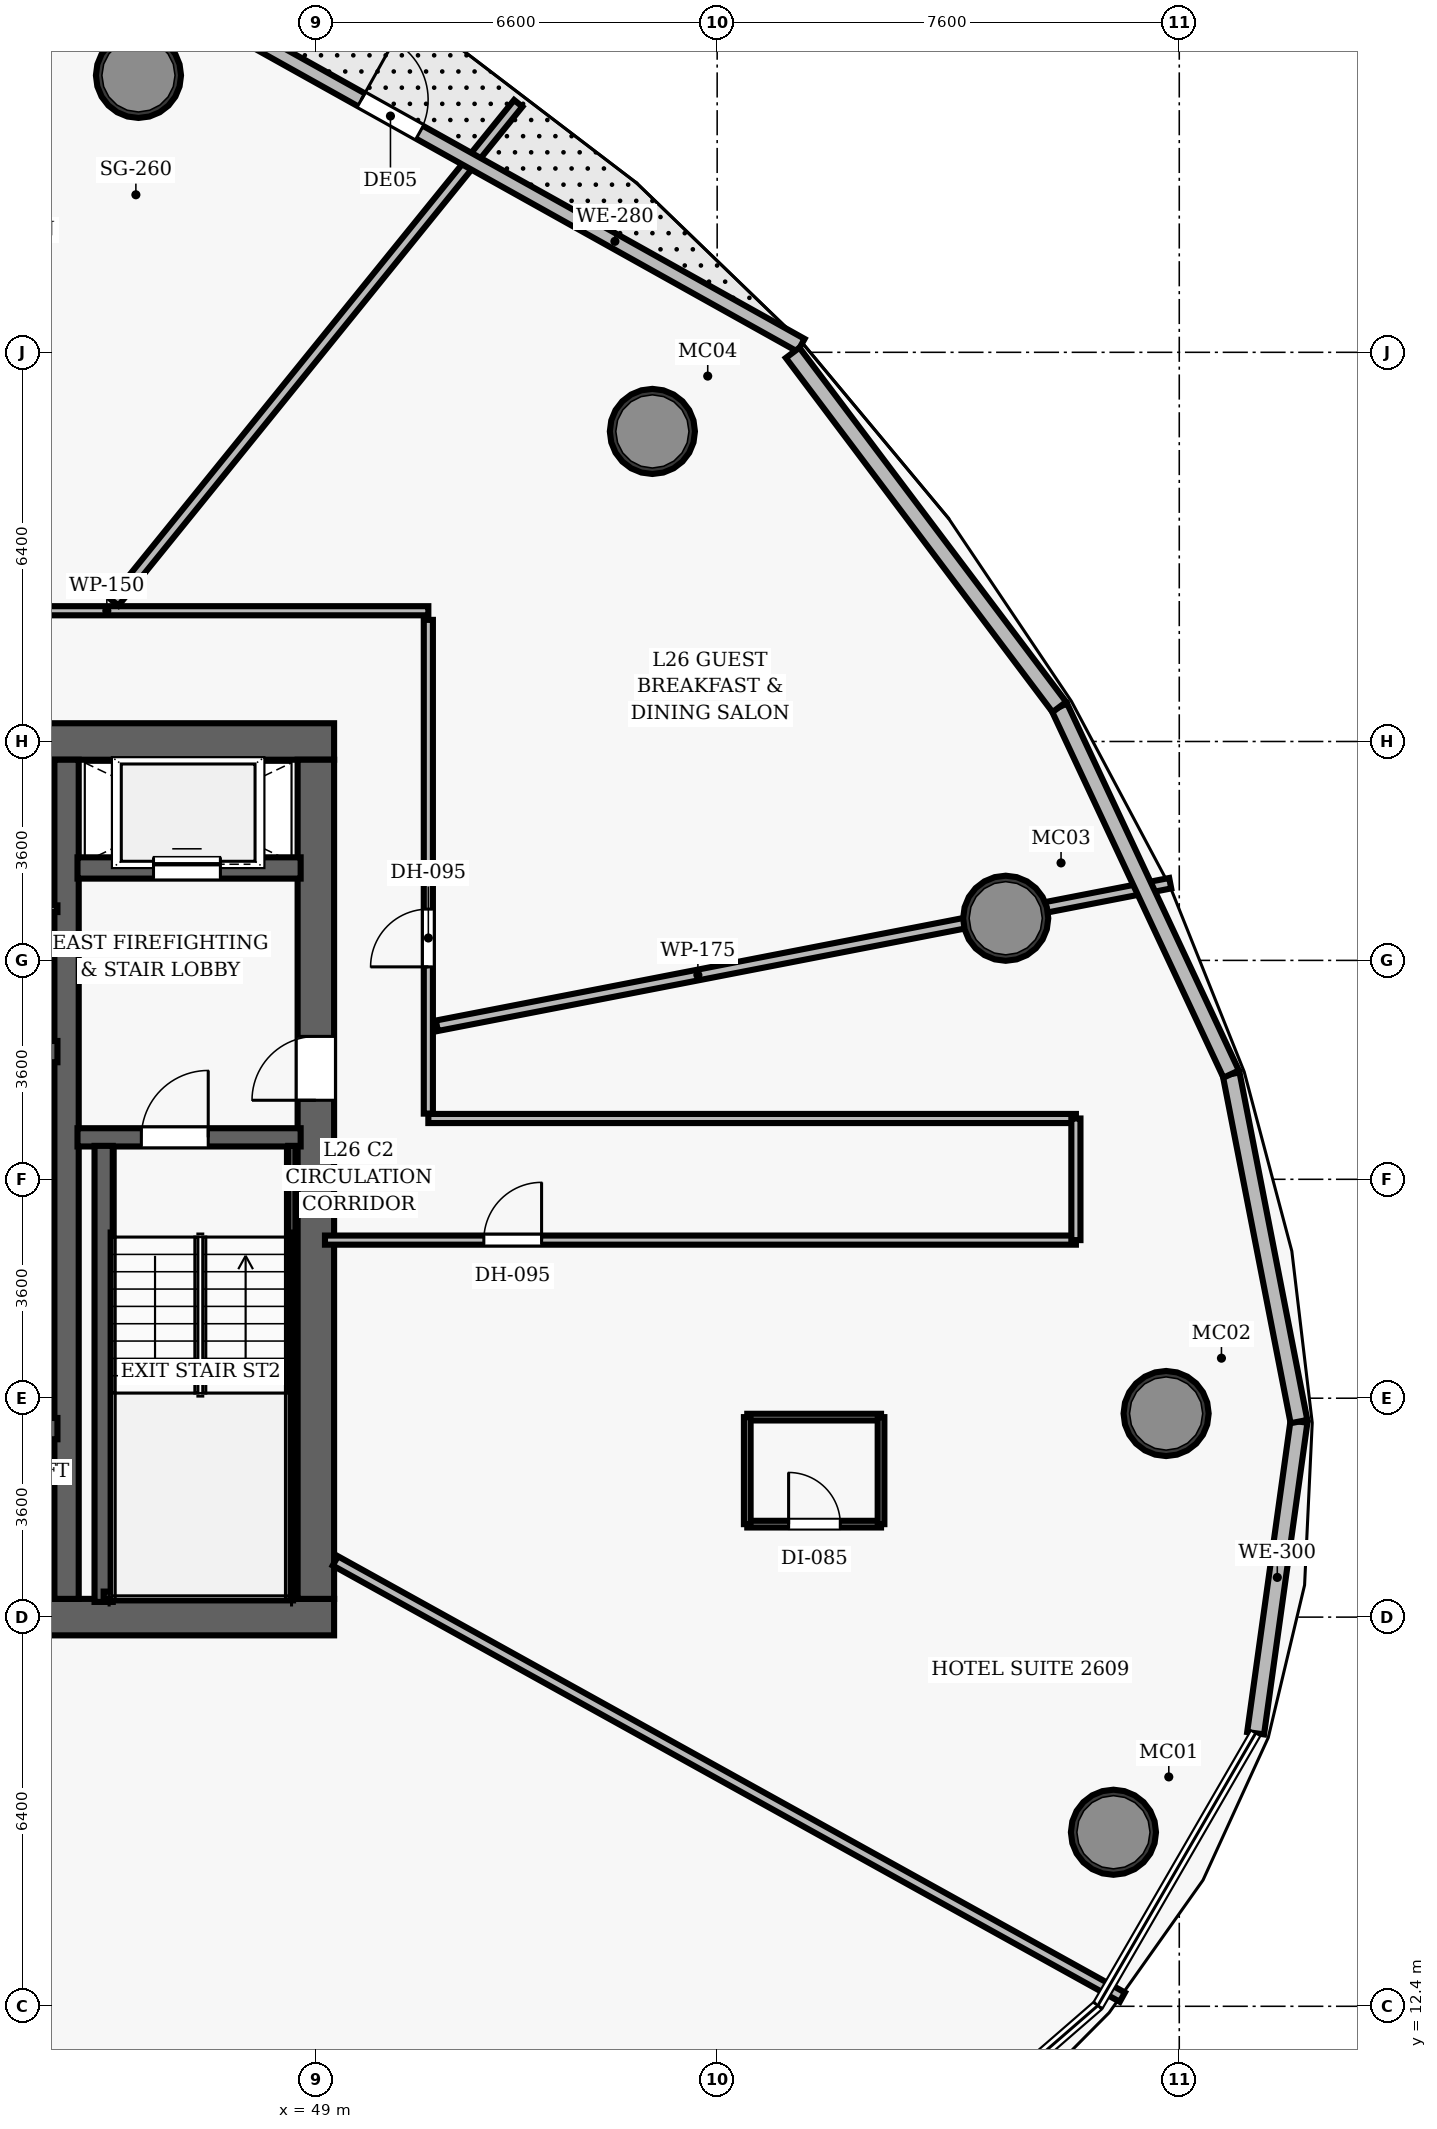
"""IFC4 building model, lengths in metres.
Left out: names, types, materials, properties, quantities, classifications, styles, units other than length and angle.
Written with IfcOpenShell. Run it as: python <this file> out.ifc"""

import sys

from ifc_helpers import new_model, si_unit, direction, frame, frame_2d, origin, origin_2d, place, context, subcontext, project, spatial, rectangle, hollow_circle, extrude, element, fill, save


model = new_model("IFC4")
c1 = context("Model", 3, precision=1e-05, world=origin(), true_north=direction((0.0, 1.0)))
c2 = subcontext(c1, "Body", "Model", "MODEL_VIEW")
j1 = project(units=[si_unit("LENGTHUNIT", "METRE"), si_unit("PLANEANGLEUNIT", "RADIAN")], contexts=[c1])
p1 = place(None, origin())
s1 = spatial("IfcSite", under=j1, at=p1, CompositionType="ELEMENT")
p2 = place(p1, origin())
s2 = spatial("IfcBuilding", under=s1, at=p2, CompositionType="ELEMENT")
p3 = place(p2, frame((0.0, 0.0, 109.8)))
s3 = spatial("IfcBuildingStorey", under=s2, at=p3, CompositionType="ELEMENT", Elevation=109.8)
p4 = place(p3, frame((26.7, 18.8, 0.0), z_axis=(0.0, 0.0, 1.0), x_axis=(1.0, 0.0, 0.0)))
e1 = element("IfcWall", 1, at=p4, inside=s3, PredefinedType="SHEAR", context=c2, shape_type="SweptSolid", body=[
    extrude(rectangle(XDim=22.6, YDim=0.6, at=frame_2d((11.3, 0.0))), origin(), (0.0, 0.0, 1.0), 3.5),
])
p5 = place(p4, frame((14.52, 0.0, 0.0)))
e2 = element("IfcOpeningElement", 2, at=p5, cuts=e1, PredefinedType="OPENING", context=c2, shape_type="SweptSolid", body=[
    extrude(rectangle(XDim=1.05, YDim=2.15, at=frame_2d((0.525, 1.075))), frame((0.0, 0.31, 0.0), z_axis=(0.0, -1.0, 0.0), x_axis=(1.0, 0.0, 0.0)), (0.0, 0.0, 1.0), 0.62),
])
p6 = place(p3, frame((26.7, 33.2, 0.0), z_axis=(0.0, 0.0, 1.0), x_axis=(1.0, 0.0, 0.0)))
e3 = element("IfcWall", 3, at=p6, inside=s3, PredefinedType="SHEAR", context=c2, shape_type="SweptSolid", body=[
    extrude(rectangle(XDim=22.6, YDim=0.6, at=frame_2d((11.3, 0.0))), origin(), (0.0, 0.0, 1.0), 3.5),
])
p7 = place(p6, frame((4.62, 0.0, 0.0)))
e4 = element("IfcOpeningElement", 4, at=p7, cuts=e3, PredefinedType="OPENING", context=c2, shape_type="SweptSolid", body=[
    extrude(rectangle(XDim=1.05, YDim=2.15, at=frame_2d((0.525, 1.075))), frame((0.0, 0.31, 0.0), z_axis=(0.0, -1.0, 0.0), x_axis=(1.0, 0.0, 0.0)), (0.0, 0.0, 1.0), 0.62),
])
p8 = place(p6, frame((14.52, 0.0, 0.0)))
e5 = element("IfcOpeningElement", 5, at=p8, cuts=e3, PredefinedType="OPENING", context=c2, shape_type="SweptSolid", body=[
    extrude(rectangle(XDim=1.05, YDim=2.15, at=frame_2d((0.525, 1.075))), frame((0.0, 0.31, 0.0), z_axis=(0.0, -1.0, 0.0), x_axis=(1.0, 0.0, 0.0)), (0.0, 0.0, 1.0), 0.62),
])
p9 = place(p3, frame((49.0, 19.1, 0.0), z_axis=(0.0, 0.0, 1.0), x_axis=(0.0, 1.0, 0.0)))
e6 = element("IfcWall", 6, at=p9, inside=s3, PredefinedType="SHEAR", context=c2, shape_type="SweptSolid", body=[
    extrude(rectangle(XDim=13.8, YDim=0.6, at=frame_2d((6.9, 0.0))), origin(), (0.0, 0.0, 1.0), 3.5),
])
p10 = place(p9, frame((8.2, 0.0, 0.0)))
e7 = element("IfcOpeningElement", 7, at=p10, cuts=e6, PredefinedType="OPENING", context=c2, shape_type="SweptSolid", body=[
    extrude(rectangle(XDim=1.05, YDim=2.15, at=frame_2d((0.525, 1.075))), frame((0.0, 0.31, 0.0), z_axis=(0.0, -1.0, 0.0), x_axis=(1.0, 0.0, 0.0)), (0.0, 0.0, 1.0), 0.62),
])
p11 = place(p3, frame((44.9, 19.1, 0.0), z_axis=(0.0, 0.0, 1.0), x_axis=(0.0, 1.0, 0.0)))
e8 = element("IfcWall", 8, at=p11, inside=s3, PredefinedType="SHEAR", context=c2, shape_type="SweptSolid", body=[
    extrude(rectangle(XDim=13.8, YDim=0.4, at=frame_2d((6.9, 0.0))), origin(), (0.0, 0.0, 1.0), 3.5),
])
for number, where, z_axis, x_axis in (
    (9, (62.118, 15.262, 0.0), (0.0, 0.0, 1.0), (1.0, 0.0, 0.0)),
    (10, (62.984, 22.148, 0.0), (0.0, 0.0, 1.0), (1.0, 0.0, 0.0)),
    (11, (60.346, 30.293, 0.0), (0.0, 0.0, 1.0), (1.0, 0.0, 0.0)),
    (12, (54.535, 38.299, 0.0), (0.0, 0.0, 1.0), (1.0, 0.0, 0.0)),
    (13, (46.083, 44.154, 0.0), (0.0, 0.0, 1.0), (1.0, 0.0, 0.0)),
):
    element("IfcColumn", number, at=place(p3, frame(where, z_axis=z_axis, x_axis=x_axis)), inside=s3, PredefinedType="COLUMN", context=c2, shape_type="SweptSolid", body=[
        extrude(hollow_circle(Radius=0.7, WallThickness=0.055, at=origin_2d()), origin(), (0.0, 0.0, 1.0), 3.5),
    ])
p12 = place(p3, frame((45.08, 26.69, 0.0), z_axis=(0.0, 0.0, 1.0), x_axis=(1.0, 0.0, 0.0)))
e14 = element("IfcWall", 14, at=p12, inside=s3, PredefinedType="SHEAR", context=c2, shape_type="SweptSolid", body=[
    extrude(rectangle(XDim=3.67, YDim=0.3, at=frame_2d((1.835, 0.0))), origin(), (0.0, 0.0, 1.0), 3.5),
])
p13 = place(p12, frame((1.05, 0.0, 0.0)))
e15 = element("IfcOpeningElement", 15, at=p13, cuts=e14, PredefinedType="OPENING", context=c2, shape_type="SweptSolid", body=[
    extrude(rectangle(XDim=1.1, YDim=2.15, at=frame_2d((0.55, 1.075))), frame((0.0, 0.16, 0.0), z_axis=(0.0, -1.0, 0.0), x_axis=(1.0, 0.0, 0.0)), (0.0, 0.0, 1.0), 0.32),
])
p14 = place(p3, frame((45.51, 19.05, 0.0), z_axis=(0.0, 0.0, 1.0), x_axis=(0.0, 1.0, 0.0)))
e16 = element("IfcWall", 16, at=p14, inside=s3, PredefinedType="SHEAR", context=c2, shape_type="SweptSolid", body=[
    extrude(rectangle(XDim=7.5, YDim=0.3, at=frame_2d((3.75, 0.0))), origin(), (0.0, 0.0, 1.0), 3.5),
])
p15 = place(p3, frame((48.605, 19.1, 0.0), z_axis=(0.0, 0.0, 1.0), x_axis=(0.0, 1.0, 0.0)))
e17 = element("IfcWall", 17, at=p15, inside=s3, PredefinedType="SHEAR", context=c2, shape_type="SweptSolid", body=[
    extrude(rectangle(XDim=7.45, YDim=0.12, at=frame_2d((3.725, 0.0))), origin(), (0.0, 0.0, 1.0), 3.5),
])
p16 = place(p3, frame((45.51, 19.16, 0.0), z_axis=(0.0, 0.0, 1.0), x_axis=(1.0, 0.0, 0.0)))
e18 = element("IfcWall", 18, at=p16, inside=s3, PredefinedType="SHEAR", context=c2, shape_type="SweptSolid", body=[
    extrude(rectangle(XDim=3.095, YDim=0.12, at=frame_2d((1.547, 0.0))), origin(), (0.0, 0.0, 1.0), 3.5),
])
p17 = place(p3, frame((45.08, 31.12, 0.0), z_axis=(0.0, 0.0, 1.0), x_axis=(1.0, 0.0, 0.0)))
e19 = element("IfcWall", 19, at=p17, inside=s3, PredefinedType="SHEAR", context=c2, shape_type="SweptSolid", body=[
    extrude(rectangle(XDim=3.67, YDim=0.35, at=frame_2d((1.835, 0.0))), origin(), (0.0, 0.0, 1.0), 2.675),
])
p18 = place(p17, frame((1.25, 0.0, 0.0)))
e20 = element("IfcOpeningElement", 20, at=p18, cuts=e19, PredefinedType="OPENING", context=c2, shape_type="SweptSolid", body=[
    extrude(rectangle(XDim=1.1, YDim=2.15, at=frame_2d((0.55, 1.075))), frame((0.0, 0.185, 0.0), z_axis=(0.0, -1.0, 0.0), x_axis=(1.0, 0.0, 0.0)), (0.0, 0.0, 1.0), 0.37),
])
for number, where, z_axis, x_axis in (
    (21, (42.72, 21.9, 0.0), (0.0, 0.0, 1.0), (1.0, 0.0, 0.0)),
    (22, (42.72, 28.1, 0.0), (0.0, 0.0, 1.0), (1.0, 0.0, 0.0)),
):
    element("IfcWall", number, at=place(p3, frame(where, z_axis=z_axis, x_axis=x_axis)), inside=s3, PredefinedType="SHEAR", context=c2, shape_type="SweptSolid", body=[
        extrude(rectangle(XDim=2.03, YDim=0.35, at=frame_2d((1.015, 0.0))), origin(), (0.0, 0.0, 1.0), 2.675),
    ])
p19 = place(p3, frame((42.55, 30.45, 0.0), z_axis=(0.0, 0.0, 1.0), x_axis=(1.0, 0.0, 0.0)))
e23 = element("IfcWall", 23, at=p19, inside=s3, PredefinedType="PARTITIONING", context=c2, shape_type="SweptSolid", body=[
    extrude(rectangle(XDim=2.2, YDim=0.11, at=frame_2d((1.1, 0.0))), origin(), (0.0, 0.0, 1.0), 2.675),
])
p20 = place(p3, frame((24.85, 35.35, 0.0), z_axis=(0.0, 0.0, 1.0), x_axis=(1.0, 0.0, 0.0)))
e24 = element("IfcWall", 24, at=p20, inside=s3, PredefinedType="PARTITIONING", context=c2, shape_type="SweptSolid", body=[
    extrude(rectangle(XDim=26.0, YDim=0.15, at=frame_2d((13.0, 0.0))), origin(), (0.0, 0.0, 1.0), 2.675),
])
p21 = place(p20, frame((14.325, 0.0, 0.0)))
e25 = element("IfcOpeningElement", 25, at=p21, cuts=e24, PredefinedType="OPENING", context=c2, shape_type="SweptSolid", body=[
    extrude(rectangle(XDim=0.95, YDim=2.15, at=frame_2d((0.475, 1.075))), frame((0.0, 0.085, 0.0), z_axis=(0.0, -1.0, 0.0), x_axis=(1.0, 0.0, 0.0)), (0.0, 0.0, 1.0), 0.17),
])
p22 = place(p20, frame((7.162, 0.0, 0.0)))
e26 = element("IfcOpeningElement", 26, at=p22, cuts=e24, PredefinedType="OPENING", context=c2, shape_type="SweptSolid", body=[
    extrude(rectangle(XDim=0.95, YDim=2.15, at=frame_2d((0.475, 1.075))), frame((0.0, 0.085, 0.0), z_axis=(0.0, -1.0, 0.0), x_axis=(1.0, 0.0, 0.0)), (0.0, 0.0, 1.0), 0.17),
])
p23 = place(p3, frame((50.85, 27.08, 0.0), z_axis=(0.0, 0.0, 1.0), x_axis=(0.0, 1.0, 0.0)))
e27 = element("IfcWall", 27, at=p23, inside=s3, PredefinedType="PARTITIONING", context=c2, shape_type="SweptSolid", body=[
    extrude(rectangle(XDim=8.12, YDim=0.15, at=frame_2d((4.06, 0.0))), origin(), (0.0, 0.0, 1.0), 2.675),
])
p24 = place(p23, frame((2.414, 0.0, 0.0)))
e28 = element("IfcOpeningElement", 28, at=p24, cuts=e27, PredefinedType="OPENING", context=c2, shape_type="SweptSolid", body=[
    extrude(rectangle(XDim=0.95, YDim=2.15, at=frame_2d((0.475, 1.075))), frame((0.0, 0.085, 0.0), z_axis=(0.0, -1.0, 0.0), x_axis=(1.0, 0.0, 0.0)), (0.0, 0.0, 1.0), 0.17),
])
p25 = place(p3, frame((50.85, 27.0, 0.0), z_axis=(0.0, 0.0, 1.0), x_axis=(1.0, 0.0, 0.0)))
e29 = element("IfcWall", 29, at=p25, inside=s3, PredefinedType="PARTITIONING", context=c2, shape_type="SweptSolid", body=[
    extrude(rectangle(XDim=10.65, YDim=0.15, at=frame_2d((5.325, 0.0))), origin(), (0.0, 0.0, 1.0), 2.675),
])
p26 = place(p3, frame((49.15, 25.0, 0.0), z_axis=(0.0, 0.0, 1.0), x_axis=(1.0, 0.0, 0.0)))
e30 = element("IfcWall", 30, at=p26, inside=s3, PredefinedType="PARTITIONING", context=c2, shape_type="SweptSolid", body=[
    extrude(rectangle(XDim=12.35, YDim=0.15, at=frame_2d((6.175, 0.0))), origin(), (0.0, 0.0, 1.0), 2.675),
])
p27 = place(p26, frame((2.613, 0.0, 0.0)))
e31 = element("IfcOpeningElement", 31, at=p27, cuts=e30, PredefinedType="OPENING", context=c2, shape_type="SweptSolid", body=[
    extrude(rectangle(XDim=0.95, YDim=2.15, at=frame_2d((0.475, 1.075))), frame((0.0, 0.085, 0.0), z_axis=(0.0, -1.0, 0.0), x_axis=(1.0, 0.0, 0.0)), (0.0, 0.0, 1.0), 0.17),
])
p28 = place(p3, frame((61.5, 25.0, 0.0), z_axis=(0.0, 0.0, 1.0), x_axis=(0.0, 1.0, 0.0)))
e32 = element("IfcWall", 32, at=p28, inside=s3, PredefinedType="PARTITIONING", context=c2, shape_type="SweptSolid", body=[
    extrude(rectangle(XDim=2.0, YDim=0.15, at=frame_2d((1.0, 0.0))), origin(), (0.0, 0.0, 1.0), 2.675),
])
p29 = place(p3, frame((50.99, 28.525, 0.0), z_axis=(0.0, 0.0, 1.0), x_axis=(0.981627073332, 0.190809561873, 0.0)))
e33 = element("IfcWall", 33, at=p29, inside=s3, PredefinedType="PARTITIONING", context=c2, shape_type="SweptSolid", body=[
    extrude(rectangle(XDim=12.287, YDim=0.175, at=frame_2d((6.144, 0.0))), origin(), (0.0, 0.0, 1.0), 2.675),
])
p30 = place(p3, frame((45.685, 35.49, 0.0), z_axis=(0.0, 0.0, 1.0), x_axis=(0.629334600488, 0.777134454665, 0.0)))
e34 = element("IfcWall", 34, at=p30, inside=s3, PredefinedType="PARTITIONING", context=c2, shape_type="SweptSolid", body=[
    extrude(rectangle(XDim=10.557, YDim=0.175, at=frame_2d((5.278, 0.0))), origin(), (0.0, 0.0, 1.0), 2.675),
])
p31 = place(p3, frame((41.643, 16.51, 0.0), z_axis=(0.0, 0.0, 1.0), x_axis=(0.358366750577, -0.933580886737, 0.0)))
e35 = element("IfcWall", 35, at=p31, inside=s3, PredefinedType="PARTITIONING", context=c2, shape_type="SweptSolid", body=[
    extrude(rectangle(XDim=13.548, YDim=0.175, at=frame_2d((6.774, 0.0))), origin(), (0.0, 0.0, 1.0), 2.675),
])
p32 = place(p3, frame((49.32, 19.725, 0.0), z_axis=(0.0, 0.0, 1.0), x_axis=(0.874626083606, -0.484798116619, 0.0)))
e36 = element("IfcWall", 36, at=p32, inside=s3, PredefinedType="PARTITIONING", context=c2, shape_type="SweptSolid", body=[
    extrude(rectangle(XDim=14.8, YDim=0.175, at=frame_2d((7.4, 0.0))), origin(), (0.0, 0.0, 1.0), 2.675),
])
p33 = place(p3, frame((56.095, 20.329, 0.0), z_axis=(0.0, 0.0, 1.0), x_axis=(1.0, 0.0, 0.0)))
e37 = element("IfcWall", 37, at=p33, inside=s3, PredefinedType="PARTITIONING", context=c2, shape_type="SweptSolid", body=[
    extrude(rectangle(XDim=2.2, YDim=0.11, at=frame_2d((1.1, 0.0))), origin(), (0.0, 0.0, 1.0), 2.675),
])
p34 = place(p33, frame((0.68, 0.0, 0.0)))
e38 = element("IfcOpeningElement", 38, at=p34, cuts=e37, PredefinedType="OPENING", context=c2, shape_type="SweptSolid", body=[
    extrude(rectangle(XDim=0.85, YDim=2.1, at=frame_2d((0.425, 1.05))), frame((0.0, 0.065, 0.0), z_axis=(0.0, -1.0, 0.0), x_axis=(1.0, 0.0, 0.0)), (0.0, 0.0, 1.0), 0.13),
])
p35 = place(p3, frame((56.095, 22.089, 0.0), z_axis=(0.0, 0.0, 1.0), x_axis=(1.0, 0.0, 0.0)))
e39 = element("IfcWall", 39, at=p35, inside=s3, PredefinedType="PARTITIONING", context=c2, shape_type="SweptSolid", body=[
    extrude(rectangle(XDim=2.2, YDim=0.11, at=frame_2d((1.1, 0.0))), origin(), (0.0, 0.0, 1.0), 2.675),
])
for number, where, z_axis, x_axis in (
    (40, (56.095, 20.329, 0.0), (0.0, 0.0, 1.0), (0.0, 1.0, 0.0)),
    (41, (58.295, 20.329, 0.0), (0.0, 0.0, 1.0), (0.0, 1.0, 0.0)),
):
    element("IfcWall", number, at=place(p3, frame(where, z_axis=z_axis, x_axis=x_axis)), inside=s3, PredefinedType="PARTITIONING", context=c2, shape_type="SweptSolid", body=[
        extrude(rectangle(XDim=1.76, YDim=0.11, at=frame_2d((0.88, 0.0))), origin(), (0.0, 0.0, 1.0), 2.675),
    ])
p36 = place(p3, frame((43.957, 46.986, 0.0), z_axis=(0.0, 0.0, 1.0), x_axis=(0.873174857764, -0.487407086293, 0.0)))
e42 = element("IfcWall", 42, at=p36, inside=s3, PredefinedType="SOLIDWALL", context=c2, shape_type="SweptSolid", body=[
    extrude(rectangle(XDim=14.914, YDim=0.24, at=frame_2d((7.457, 0.0))), origin(), (0.0, 0.0, 1.0), 2.45),
])
p37 = place(p36, frame((6.631, 0.0, 0.0)))
e43 = element("IfcOpeningElement", 43, at=p37, cuts=e42, PredefinedType="OPENING", context=c2, shape_type="SweptSolid", body=[
    extrude(rectangle(XDim=1.1, YDim=2.2, at=frame_2d((0.55, 1.1))), frame((0.0, 0.13, 0.0), z_axis=(0.0, -1.0, 0.0), x_axis=(1.0, 0.0, 0.0)), (0.0, 0.0, 1.0), 0.26),
])
p38 = place(p3, frame((65.169, 22.016, 0.0), z_axis=(0.0, 0.0, 1.0), x_axis=(-0.137820388365, -0.990457238123, 0.0)))
e44 = element("IfcWall", 44, at=p38, inside=s3, PredefinedType="SOLIDWALL", context=c2, shape_type="SweptSolid", body=[
    extrude(rectangle(XDim=5.174, YDim=0.28, at=frame_2d((2.587, 0.0))), origin(), (0.0, 0.0, 1.0), 3.26),
])
p39 = place(p3, frame((64.053, 27.73, 0.0), z_axis=(0.0, 0.0, 1.0), x_axis=(0.191534003283, -0.981485978293, 0.0)))
e45 = element("IfcWall", 45, at=p39, inside=s3, PredefinedType="SOLIDWALL", context=c2, shape_type="SweptSolid", body=[
    extrude(rectangle(XDim=5.823, YDim=0.28, at=frame_2d((2.911, 0.0))), origin(), (0.0, 0.0, 1.0), 3.26),
])
p40 = place(p3, frame((61.228, 33.767, 0.0), z_axis=(0.0, 0.0, 1.0), x_axis=(0.423988051786, -0.905667782326, 0.0)))
e46 = element("IfcWall", 46, at=p40, inside=s3, PredefinedType="SOLIDWALL", context=c2, shape_type="SweptSolid", body=[
    extrude(rectangle(XDim=6.665, YDim=0.28, at=frame_2d((3.333, 0.0))), origin(), (0.0, 0.0, 1.0), 3.26),
])
p41 = place(p3, frame((56.842, 39.592, 0.0), z_axis=(0.0, 0.0, 1.0), x_axis=(0.601461468867, -0.798901809654, 0.0)))
e47 = element("IfcWall", 47, at=p41, inside=s3, PredefinedType="SOLIDWALL", context=c2, shape_type="SweptSolid", body=[
    extrude(rectangle(XDim=7.292, YDim=0.28, at=frame_2d((3.646, 0.0))), origin(), (0.0, 0.0, 1.0), 3.26),
])
p42 = place(p13, origin())
e48 = element("IfcDoor", 48, at=p42, inside=s3, OperationType="SINGLE_SWING_RIGHT", PredefinedType="DOOR", context=c2, shape_type="SweptSolid", body=[
    extrude(rectangle(XDim=1.1, YDim=2.15, at=frame_2d((0.55, 1.075))), frame((0.0, 0.025, 0.0), z_axis=(0.0, -1.0, 0.0), x_axis=(1.0, 0.0, 0.0)), (0.0, 0.0, 1.0), 0.05),
])
fill(e15, e48)
p43 = place(p10, origin())
e49 = element("IfcDoor", 49, at=p43, inside=s3, OperationType="SINGLE_SWING_LEFT", PredefinedType="DOOR", context=c2, shape_type="SweptSolid", body=[
    extrude(rectangle(XDim=1.05, YDim=2.15, at=frame_2d((0.525, 1.075))), frame((0.0, 0.025, 0.0), z_axis=(0.0, -1.0, 0.0), x_axis=(1.0, 0.0, 0.0)), (0.0, 0.0, 1.0), 0.05),
])
fill(e7, e49)
p44 = place(p24, origin())
e50 = element("IfcDoor", 50, at=p44, inside=s3, OperationType="SINGLE_SWING_LEFT", PredefinedType="DOOR", context=c2, shape_type="SweptSolid", body=[
    extrude(rectangle(XDim=0.95, YDim=2.15, at=frame_2d((0.475, 1.075))), frame((0.0, 0.025, 0.0), z_axis=(0.0, -1.0, 0.0), x_axis=(1.0, 0.0, 0.0)), (0.0, 0.0, 1.0), 0.05),
])
fill(e28, e50)
p45 = place(p27, origin())
e51 = element("IfcDoor", 51, at=p45, inside=s3, OperationType="SINGLE_SWING_RIGHT", PredefinedType="DOOR", context=c2, shape_type="SweptSolid", body=[
    extrude(rectangle(XDim=0.95, YDim=2.15, at=frame_2d((0.475, 1.075))), frame((0.0, 0.025, 0.0), z_axis=(0.0, -1.0, 0.0), x_axis=(1.0, 0.0, 0.0)), (0.0, 0.0, 1.0), 0.05),
])
fill(e31, e51)
p46 = place(p34, origin())
e52 = element("IfcDoor", 52, at=p46, inside=s3, OperationType="SINGLE_SWING_LEFT", PredefinedType="DOOR", context=c2, shape_type="SweptSolid", body=[
    extrude(rectangle(XDim=0.85, YDim=2.1, at=frame_2d((0.425, 1.05))), frame((0.0, 0.025, 0.0), z_axis=(0.0, -1.0, 0.0), x_axis=(1.0, 0.0, 0.0)), (0.0, 0.0, 1.0), 0.05),
])
fill(e38, e52)
p47 = place(p18, origin())
e53 = element("IfcDoor", 53, at=p47, inside=s3, OperationType="SLIDING_TO_LEFT", PredefinedType="DOOR", context=c2, shape_type="SweptSolid", body=[
    extrude(rectangle(XDim=1.1, YDim=2.15, at=frame_2d((0.55, 1.075))), frame((0.0, 0.025, 0.0), z_axis=(0.0, -1.0, 0.0), x_axis=(1.0, 0.0, 0.0)), (0.0, 0.0, 1.0), 0.05),
])
fill(e20, e53)
p48 = place(p37, origin())
e54 = element("IfcDoor", 54, at=p48, inside=s3, OperationType="SINGLE_SWING_LEFT", PredefinedType="DOOR", context=c2, shape_type="SweptSolid", body=[
    extrude(rectangle(XDim=1.1, YDim=2.2, at=frame_2d((0.55, 1.1))), frame((0.0, 0.025, 0.0), z_axis=(0.0, -1.0, 0.0), x_axis=(1.0, 0.0, 0.0)), (0.0, 0.0, 1.0), 0.05),
])
fill(e43, e54)
save(model, sys.argv[1])
